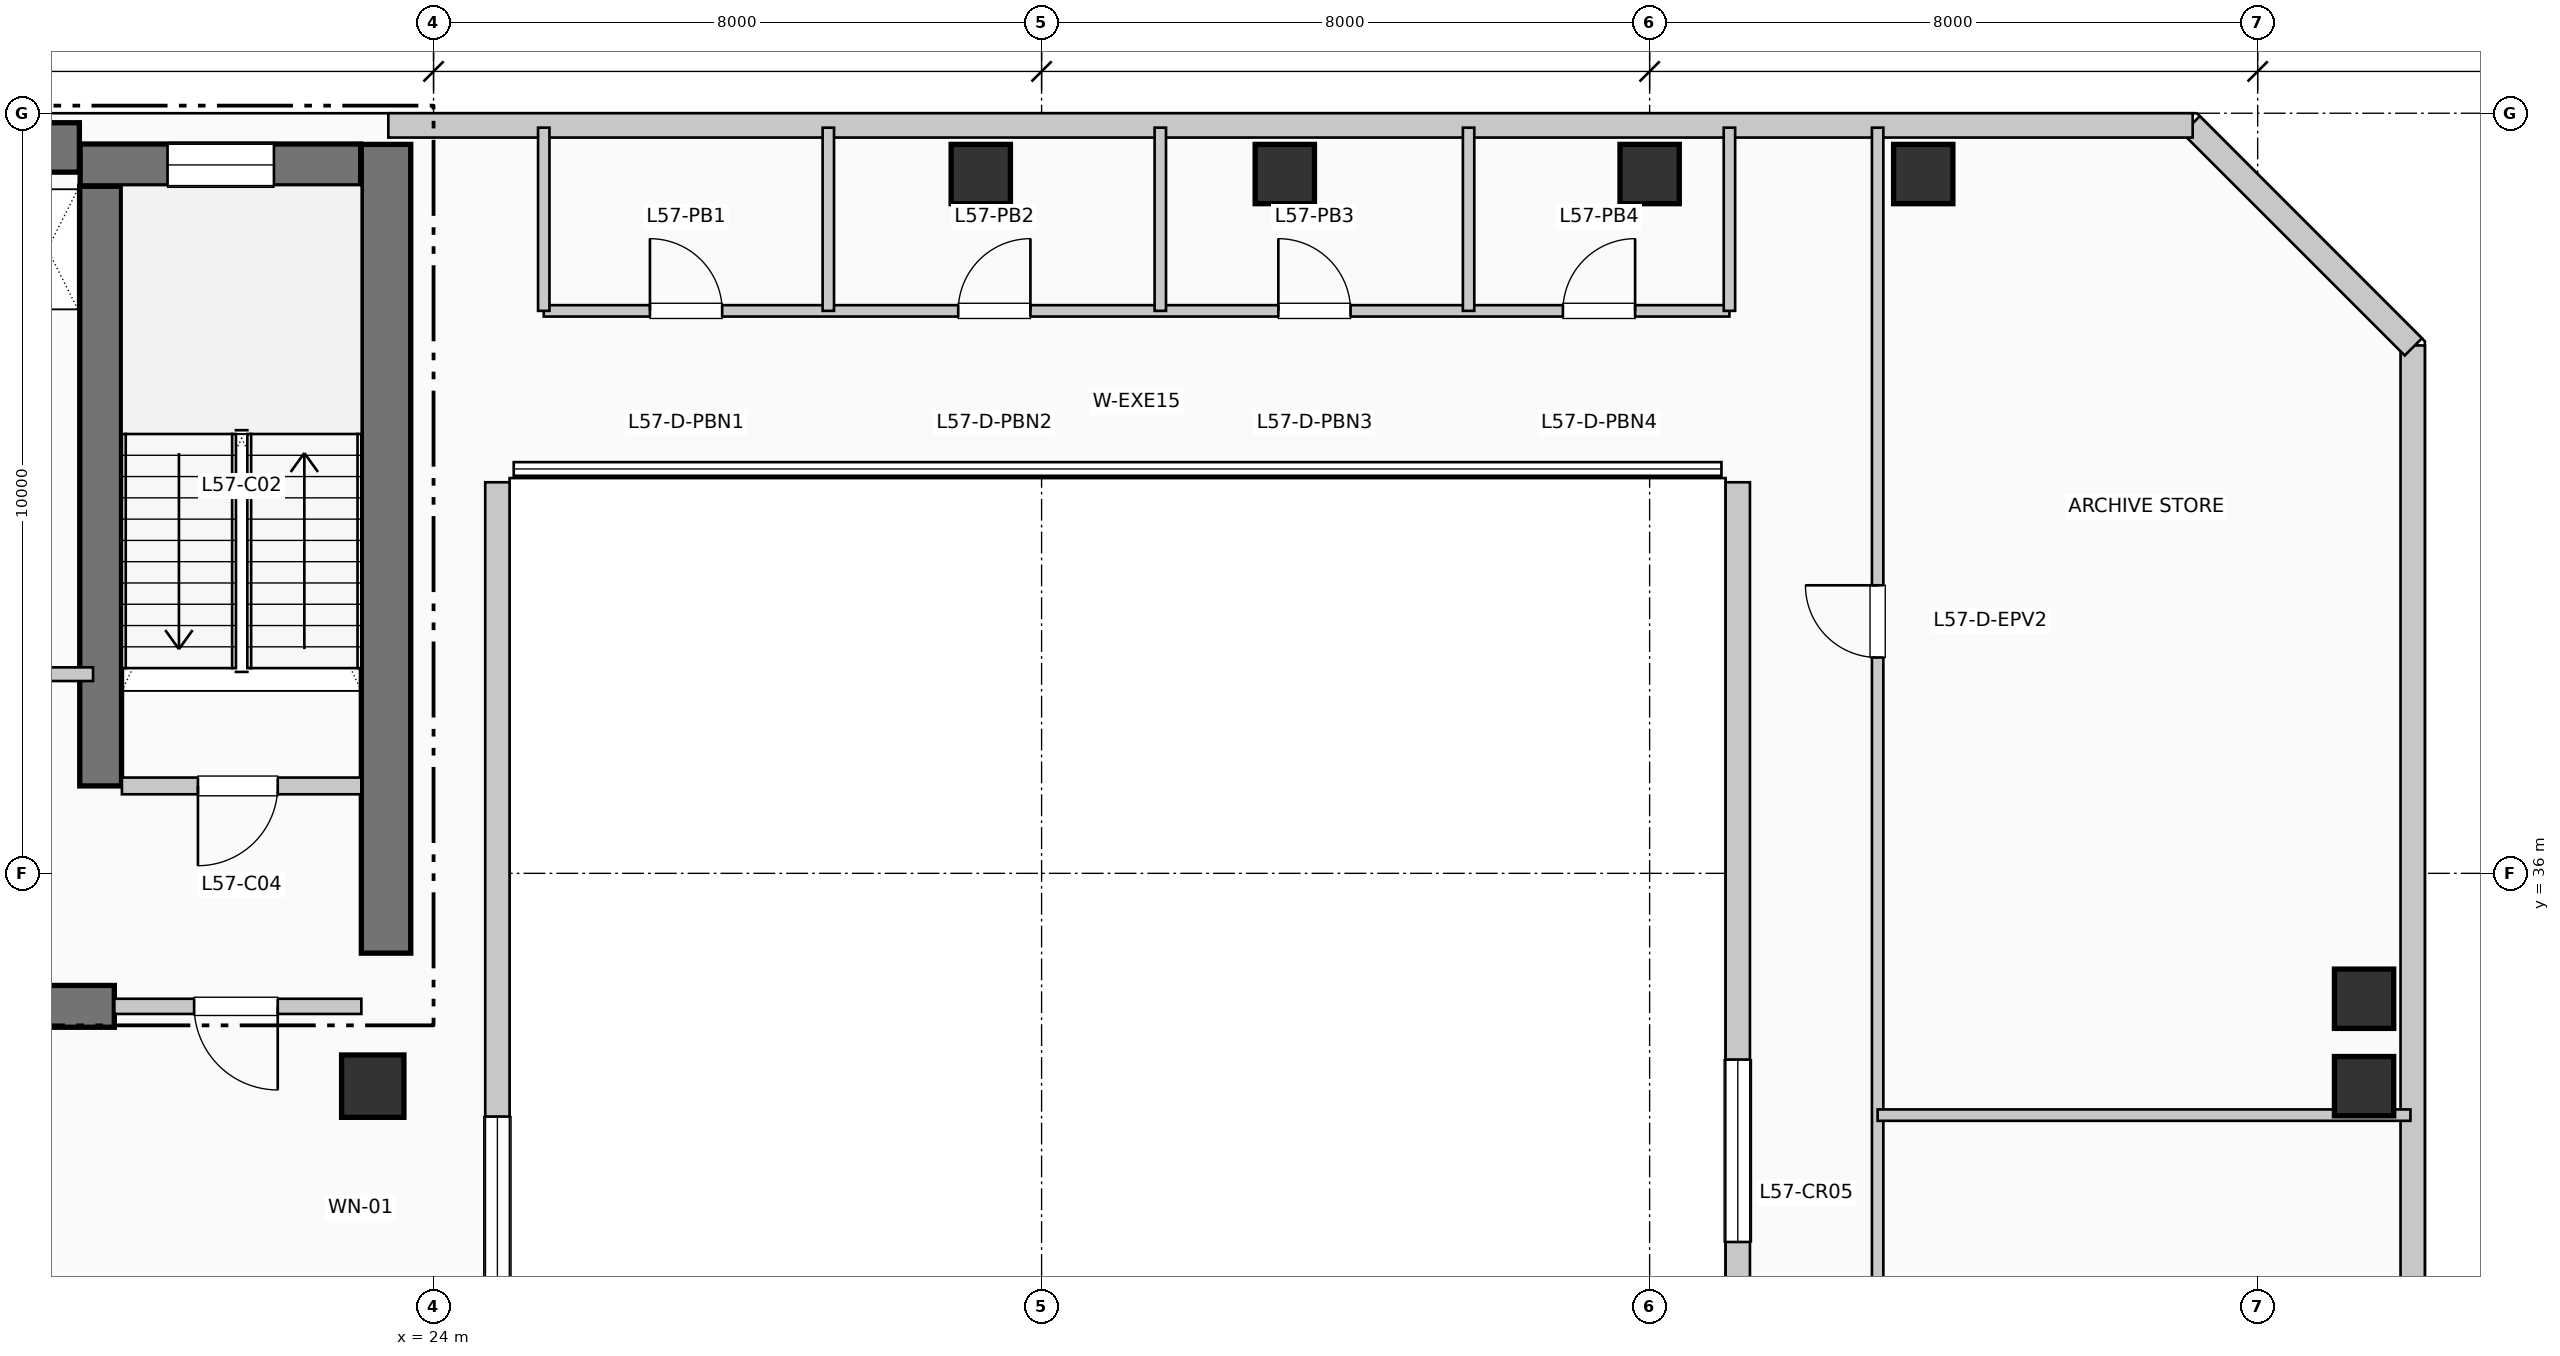
"""IFC4 building model, lengths in metres.
Left out: names, types, materials, properties, quantities, classifications, styles, units other than length and angle.
Written with IfcOpenShell. Run it as: python <this file> out.ifc"""

import sys

from ifc_helpers import new_model, si_unit, direction, frame, frame_2d, origin, origin_2d, place, context, subcontext, project, spatial, rectangle, extrude, element, fill, save


model = new_model("IFC4")
c1 = context("Model", 3, precision=1e-05, world=origin(), true_north=direction((0.0, 1.0)))
c2 = subcontext(c1, "Body", "Model", "MODEL_VIEW")
j1 = project(units=[si_unit("LENGTHUNIT", "METRE"), si_unit("PLANEANGLEUNIT", "RADIAN")], contexts=[c1])
p1 = place(None, origin())
s1 = spatial("IfcSite", under=j1, at=p1, CompositionType="ELEMENT")
p2 = place(p1, origin())
s2 = spatial("IfcBuilding", under=s1, at=p2, CompositionType="ELEMENT")
p3 = place(p2, frame((0.0, 0.0, 235.62)))
s3 = spatial("IfcBuildingStorey", under=s2, at=p3, CompositionType="ELEMENT", Elevation=235.62)
p4 = place(p3, frame((5.36, 45.55, 0.0), z_axis=(0.0, 0.0, 1.0), x_axis=(1.0, 0.0, 0.0)))
e1 = element("IfcWall", 1, at=p4, inside=s3, PredefinedType="SHEAR", context=c2, shape_type="SweptSolid", body=[
    extrude(rectangle(XDim=13.98, YDim=0.65, at=frame_2d((6.99, 0.0))), origin(), (0.0, 0.0, 1.0), 3.96),
])
p5 = place(p3, frame((23.375, 34.95, 0.0), z_axis=(0.0, 0.0, 1.0), x_axis=(0.0, 1.0, 0.0)))
e2 = element("IfcWall", 2, at=p5, inside=s3, PredefinedType="SHEAR", context=c2, shape_type="SweptSolid", body=[
    extrude(rectangle(XDim=10.64, YDim=0.65, at=frame_2d((5.32, 0.0))), origin(), (0.0, 0.0, 1.0), 3.96),
])
p6 = place(p3, frame((13.68, 34.25, 0.0), z_axis=(0.0, 0.0, 1.0), x_axis=(1.0, 0.0, 0.0)))
e3 = element("IfcWall", 3, at=p6, inside=s3, PredefinedType="SHEAR", context=c2, shape_type="SweptSolid", body=[
    extrude(rectangle(XDim=6.12, YDim=0.55, at=frame_2d((3.06, 0.0))), origin(), (0.0, 0.0, 1.0), 3.96),
])
p7 = place(p3, frame((19.62, 37.15, 0.0), z_axis=(0.0, 0.0, 1.0), x_axis=(0.0, 1.0, 0.0)))
e4 = element("IfcWall", 4, at=p7, inside=s3, PredefinedType="SHEAR", context=c2, shape_type="SweptSolid", body=[
    extrude(rectangle(XDim=7.89, YDim=0.55, at=frame_2d((3.945, 0.0))), origin(), (0.0, 0.0, 1.0), 3.96),
])
p8 = place(p3, frame((19.35, 45.32, 0.0), z_axis=(0.0, 0.0, 1.0), x_axis=(1.0, 0.0, 0.0)))
e5 = element("IfcWall", 5, at=p8, inside=s3, PredefinedType="SHEAR", context=c2, shape_type="SweptSolid", body=[
    extrude(rectangle(XDim=3.69, YDim=0.55, at=frame_2d((1.845, 0.0))), origin(), (0.0, 0.0, 1.0), 3.96),
])
p9 = place(p8, frame((1.15, 0.0, 1.05)))
e6 = element("IfcOpeningElement", 6, at=p9, cuts=e5, PredefinedType="OPENING", context=c2, shape_type="SweptSolid", body=[
    extrude(rectangle(XDim=1.4, YDim=1.8, at=frame_2d((0.7, 0.9))), frame((0.0, 0.285, 0.0), z_axis=(0.0, -1.0, 0.0), x_axis=(1.0, 0.0, 0.0)), (0.0, 0.0, 1.0), 0.57),
])
p10 = place(p3, frame((23.2, 33.2, 0.0), z_axis=(0.0, 0.0, 1.0), x_axis=(1.0, 0.0, 0.0)))
e7 = element("IfcColumn", 7, at=p10, inside=s3, PredefinedType="COLUMN", context=c2, shape_type="SweptSolid", body=[
    extrude(rectangle(XDim=0.82, YDim=0.82, at=origin_2d()), origin(), (0.0, 0.0, 1.0), 3.96),
])
for number, where, z_axis, x_axis in (
    (8, (31.2, 45.2, 0.0), (0.0, 0.0, 1.0), (1.0, 0.0, 0.0)),
    (9, (35.2, 45.2, 0.0), (0.0, 0.0, 1.0), (1.0, 0.0, 0.0)),
    (10, (40.0, 45.2, 0.0), (0.0, 0.0, 1.0), (1.0, 0.0, 0.0)),
    (11, (43.6, 45.2, 0.0), (0.0, 0.0, 1.0), (1.0, 0.0, 0.0)),
    (12, (49.4, 33.2, 0.0), (0.0, 0.0, 1.0), (1.0, 0.0, 0.0)),
    (13, (49.4, 34.35, 0.0), (0.0, 0.0, 1.0), (1.0, 0.0, 0.0)),
):
    element("IfcColumn", number, at=place(p3, frame(where, z_axis=z_axis, x_axis=x_axis)), inside=s3, PredefinedType="COLUMN", context=c2, shape_type="SweptSolid", body=[
        extrude(rectangle(XDim=0.78, YDim=0.78, at=origin_2d()), origin(), (0.0, 0.0, 1.0), 3.96),
    ])
p11 = place(p3, frame((24.84, 22.055, 0.0), z_axis=(0.0, 0.0, 1.0), x_axis=(0.0, 1.0, 0.0)))
e14 = element("IfcWall", 14, at=p11, inside=s3, PredefinedType="SOLIDWALL", context=c2, shape_type="SweptSolid", body=[
    extrude(rectangle(XDim=19.09, YDim=0.32, at=frame_2d((9.545, 0.0))), origin(), (0.0, 0.0, 1.0), 3.71),
])
p12 = place(p11, frame((8.345, 0.0, 0.85)))
e15 = element("IfcOpeningElement", 15, at=p12, cuts=e14, PredefinedType="OPENING", context=c2, shape_type="SweptSolid", body=[
    extrude(rectangle(XDim=2.4, YDim=2.05, at=frame_2d((1.2, 1.025))), frame((0.0, 0.17, 0.0), z_axis=(0.0, -1.0, 0.0), x_axis=(1.0, 0.0, 0.0)), (0.0, 0.0, 1.0), 0.34),
])
p13 = place(p3, frame((41.16, 41.145, 0.0), z_axis=(0.0, 0.0, 1.0), x_axis=(0.0, -1.0, 0.0)))
e16 = element("IfcWall", 16, at=p13, inside=s3, PredefinedType="SOLIDWALL", context=c2, shape_type="SweptSolid", body=[
    extrude(rectangle(XDim=17.59, YDim=0.32, at=frame_2d((8.795, 0.0))), origin(), (0.0, 0.0, 1.0), 3.71),
])
p14 = place(p13, frame((7.595, 0.0, 0.85)))
e17 = element("IfcOpeningElement", 17, at=p14, cuts=e16, PredefinedType="OPENING", context=c2, shape_type="SweptSolid", body=[
    extrude(rectangle(XDim=2.4, YDim=2.05, at=frame_2d((1.2, 1.025))), frame((0.0, 0.17, 0.0), z_axis=(0.0, -1.0, 0.0), x_axis=(1.0, 0.0, 0.0)), (0.0, 0.0, 1.0), 0.34),
])
p15 = place(p3, frame((50.04, 25.055, 0.0), z_axis=(0.0, 0.0, 1.0), x_axis=(0.0, 1.0, 0.0)))
e18 = element("IfcWall", 18, at=p15, inside=s3, PredefinedType="SOLIDWALL", context=c2, shape_type="SweptSolid", body=[
    extrude(rectangle(XDim=17.89, YDim=0.32, at=frame_2d((8.945, 0.0))), origin(), (0.0, 0.0, 1.0), 3.71),
])
p16 = place(p3, frame((50.048, 42.926, 0.0), z_axis=(0.0, 0.0, 1.0), x_axis=(-0.707136318428, 0.707077242712, 0.0)))
e19 = element("IfcWall", 19, at=p16, inside=s3, PredefinedType="SOLIDWALL", context=c2, shape_type="SweptSolid", body=[
    extrude(rectangle(XDim=4.133, YDim=0.32, at=frame_2d((2.066, 0.0))), origin(), (0.0, 0.0, 1.0), 3.71),
])
p17 = place(p3, frame((47.145, 45.84, 0.0), z_axis=(0.0, 0.0, 1.0), x_axis=(-1.0, 0.0, 0.0)))
e20 = element("IfcWall", 20, at=p17, inside=s3, PredefinedType="SOLIDWALL", context=c2, shape_type="SweptSolid", body=[
    extrude(rectangle(XDim=23.74, YDim=0.32, at=frame_2d((11.87, 0.0))), origin(), (0.0, 0.0, 1.0), 3.71),
])
p18 = place(p3, frame((19.9, 37.15, 0.0), z_axis=(0.0, 0.0, 1.0), x_axis=(1.0, 0.0, 0.0)))
e21 = element("IfcWall", 21, at=p18, inside=s3, PredefinedType="PARTITIONING", context=c2, shape_type="SweptSolid", body=[
    extrude(rectangle(XDim=3.15, YDim=0.22, at=frame_2d((1.575, 0.0))), origin(), (0.0, 0.0, 1.0), 3.71),
])
p19 = place(p18, frame((2.05, 0.0, 0.0), z_axis=(0.0, 0.0, 1.0), x_axis=(-1.0, 0.0, 0.0)))
e22 = element("IfcOpeningElement", 22, at=p19, cuts=e21, PredefinedType="OPENING", context=c2, shape_type="SweptSolid", body=[
    extrude(rectangle(XDim=1.05, YDim=2.15, at=frame_2d((0.525, 1.075))), frame((0.0, 0.12, 0.0), z_axis=(0.0, -1.0, 0.0), x_axis=(1.0, 0.0, 0.0)), (0.0, 0.0, 1.0), 0.24),
])
p20 = place(p3, frame((19.8, 34.25, 0.0), z_axis=(0.0, 0.0, 1.0), x_axis=(1.0, 0.0, 0.0)))
e23 = element("IfcWall", 23, at=p20, inside=s3, PredefinedType="PARTITIONING", context=c2, shape_type="SweptSolid", body=[
    extrude(rectangle(XDim=3.25, YDim=0.2, at=frame_2d((1.625, 0.0))), origin(), (0.0, 0.0, 1.0), 3.71),
])
p21 = place(p20, frame((2.15, 0.0, 0.0), z_axis=(0.0, 0.0, 1.0), x_axis=(-1.0, 0.0, 0.0)))
e24 = element("IfcOpeningElement", 24, at=p21, cuts=e23, PredefinedType="OPENING", context=c2, shape_type="SweptSolid", body=[
    extrude(rectangle(XDim=1.1, YDim=2.15, at=frame_2d((0.55, 1.075))), frame((0.0, 0.11, 0.0), z_axis=(0.0, -1.0, 0.0), x_axis=(1.0, 0.0, 0.0)), (0.0, 0.0, 1.0), 0.22),
])
p22 = place(p3, frame((17.68, 38.62, 0.0), z_axis=(0.0, 0.0, 1.0), x_axis=(1.0, 0.0, 0.0)))
e25 = element("IfcWall", 25, at=p22, inside=s3, PredefinedType="PARTITIONING", context=c2, shape_type="SweptSolid", body=[
    extrude(rectangle(XDim=1.84, YDim=0.18, at=frame_2d((0.92, 0.0))), origin(), (0.0, 0.0, 1.0), 3.71),
])
p23 = place(p22, frame((0.24, 0.0, 0.0)))
e26 = element("IfcOpeningElement", 26, at=p23, cuts=e25, PredefinedType="OPENING", context=c2, shape_type="SweptSolid", body=[
    extrude(rectangle(XDim=0.92, YDim=2.1, at=frame_2d((0.46, 1.05))), frame((0.0, 0.1, 0.0), z_axis=(0.0, -1.0, 0.0), x_axis=(1.0, 0.0, 0.0)), (0.0, 0.0, 1.0), 0.2),
])
p24 = place(p3, frame((25.45, 43.4, 0.0), z_axis=(0.0, 0.0, 1.0), x_axis=(1.0, 0.0, 0.0)))
e27 = element("IfcWall", 27, at=p24, inside=s3, PredefinedType="PARTITIONING", context=c2, shape_type="SweptSolid", body=[
    extrude(rectangle(XDim=15.6, YDim=0.15, at=frame_2d((7.8, 0.0))), origin(), (0.0, 0.0, 1.0), 3.71),
])
p25 = place(p24, frame((1.397, 0.0, 0.0)))
e28 = element("IfcOpeningElement", 28, at=p25, cuts=e27, PredefinedType="OPENING", context=c2, shape_type="SweptSolid", body=[
    extrude(rectangle(XDim=0.95, YDim=2.15, at=frame_2d((0.475, 1.075))), frame((0.0, 0.085, 0.0), z_axis=(0.0, -1.0, 0.0), x_axis=(1.0, 0.0, 0.0)), (0.0, 0.0, 1.0), 0.17),
])
p26 = place(p24, frame((5.453, 0.0, 0.0)))
e29 = element("IfcOpeningElement", 29, at=p26, cuts=e27, PredefinedType="OPENING", context=c2, shape_type="SweptSolid", body=[
    extrude(rectangle(XDim=0.95, YDim=2.15, at=frame_2d((0.475, 1.075))), frame((0.0, 0.085, 0.0), z_axis=(0.0, -1.0, 0.0), x_axis=(1.0, 0.0, 0.0)), (0.0, 0.0, 1.0), 0.17),
])
p27 = place(p24, frame((9.665, 0.0, 0.0)))
e30 = element("IfcOpeningElement", 30, at=p27, cuts=e27, PredefinedType="OPENING", context=c2, shape_type="SweptSolid", body=[
    extrude(rectangle(XDim=0.95, YDim=2.15, at=frame_2d((0.475, 1.075))), frame((0.0, 0.085, 0.0), z_axis=(0.0, -1.0, 0.0), x_axis=(1.0, 0.0, 0.0)), (0.0, 0.0, 1.0), 0.17),
])
p28 = place(p24, frame((13.409, 0.0, 0.0)))
e31 = element("IfcOpeningElement", 31, at=p28, cuts=e27, PredefinedType="OPENING", context=c2, shape_type="SweptSolid", body=[
    extrude(rectangle(XDim=0.95, YDim=2.15, at=frame_2d((0.475, 1.075))), frame((0.0, 0.085, 0.0), z_axis=(0.0, -1.0, 0.0), x_axis=(1.0, 0.0, 0.0)), (0.0, 0.0, 1.0), 0.17),
])
for number, where, z_axis, x_axis in (
    (32, (25.45, 43.4, 0.0), (0.0, 0.0, 1.0), (0.0, 1.0, 0.0)),
    (33, (41.05, 43.4, 0.0), (0.0, 0.0, 1.0), (0.0, 1.0, 0.0)),
    (34, (29.194, 43.4, 0.0), (0.0, 0.0, 1.0), (0.0, 1.0, 0.0)),
    (35, (33.562, 43.4, 0.0), (0.0, 0.0, 1.0), (0.0, 1.0, 0.0)),
    (36, (37.618, 43.4, 0.0), (0.0, 0.0, 1.0), (0.0, 1.0, 0.0)),
):
    element("IfcWall", number, at=place(p3, frame(where, z_axis=z_axis, x_axis=x_axis)), inside=s3, PredefinedType="PARTITIONING", context=c2, shape_type="SweptSolid", body=[
        extrude(rectangle(XDim=2.41, YDim=0.15, at=frame_2d((1.205, 0.0))), origin(), (0.0, 0.0, 1.0), 3.71),
    ])
p29 = place(p3, frame((43.0, 22.19, 0.0), z_axis=(0.0, 0.0, 1.0), x_axis=(0.0, 1.0, 0.0)))
e37 = element("IfcWall", 37, at=p29, inside=s3, PredefinedType="PARTITIONING", context=c2, shape_type="SweptSolid", body=[
    extrude(rectangle(XDim=23.62, YDim=0.15, at=frame_2d((11.81, 0.0))), origin(), (0.0, 0.0, 1.0), 3.71),
])
p30 = place(p29, frame((4.84, 0.0, 0.0)))
e38 = element("IfcOpeningElement", 38, at=p30, cuts=e37, PredefinedType="OPENING", context=c2, shape_type="SweptSolid", body=[
    extrude(rectangle(XDim=0.95, YDim=2.15, at=frame_2d((0.475, 1.075))), frame((0.0, 0.085, 0.0), z_axis=(0.0, -1.0, 0.0), x_axis=(1.0, 0.0, 0.0)), (0.0, 0.0, 1.0), 0.17),
])
p31 = place(p29, frame((16.649, 0.0, 0.0)))
e39 = element("IfcOpeningElement", 39, at=p31, cuts=e37, PredefinedType="OPENING", context=c2, shape_type="SweptSolid", body=[
    extrude(rectangle(XDim=0.95, YDim=2.15, at=frame_2d((0.475, 1.075))), frame((0.0, 0.085, 0.0), z_axis=(0.0, -1.0, 0.0), x_axis=(1.0, 0.0, 0.0)), (0.0, 0.0, 1.0), 0.17),
])
p32 = place(p3, frame((43.0, 32.819, 0.0), z_axis=(0.0, 0.0, 1.0), x_axis=(1.0, 0.0, 0.0)))
e40 = element("IfcWall", 40, at=p32, inside=s3, PredefinedType="PARTITIONING", context=c2, shape_type="SweptSolid", body=[
    extrude(rectangle(XDim=7.01, YDim=0.15, at=frame_2d((3.505, 0.0))), origin(), (0.0, 0.0, 1.0), 3.71),
])
p33 = place(p9, origin())
e41 = element("IfcWindow", 41, at=p33, inside=s3, PartitioningType="SINGLE_PANEL", PredefinedType="WINDOW", context=c2, shape_type="SweptSolid", body=[
    extrude(rectangle(XDim=1.4, YDim=1.8, at=frame_2d((0.7, 0.9))), frame((0.0, 0.03, 0.0), z_axis=(0.0, -1.0, 0.0), x_axis=(1.0, 0.0, 0.0)), (0.0, 0.0, 1.0), 0.06),
])
fill(e6, e41)
p34 = place(p12, origin())
e42 = element("IfcWindow", 42, at=p34, inside=s3, PartitioningType="SINGLE_PANEL", PredefinedType="WINDOW", context=c2, shape_type="SweptSolid", body=[
    extrude(rectangle(XDim=2.4, YDim=2.05, at=frame_2d((1.2, 1.025))), frame((0.0, 0.03, 0.0), z_axis=(0.0, -1.0, 0.0), x_axis=(1.0, 0.0, 0.0)), (0.0, 0.0, 1.0), 0.06),
])
fill(e15, e42)
p35 = place(p14, origin())
e43 = element("IfcWindow", 43, at=p35, inside=s3, PartitioningType="SINGLE_PANEL", PredefinedType="WINDOW", context=c2, shape_type="SweptSolid", body=[
    extrude(rectangle(XDim=2.4, YDim=2.05, at=frame_2d((1.2, 1.025))), frame((0.0, 0.03, 0.0), z_axis=(0.0, -1.0, 0.0), x_axis=(1.0, 0.0, 0.0)), (0.0, 0.0, 1.0), 0.06),
])
fill(e17, e43)
p36 = place(p19, origin())
e44 = element("IfcDoor", 44, at=p36, inside=s3, OperationType="SINGLE_SWING_LEFT", PredefinedType="DOOR", context=c2, shape_type="SweptSolid", body=[
    extrude(rectangle(XDim=1.05, YDim=2.15, at=frame_2d((0.525, 1.075))), frame((0.0, 0.025, 0.0), z_axis=(0.0, -1.0, 0.0), x_axis=(1.0, 0.0, 0.0)), (0.0, 0.0, 1.0), 0.05),
])
fill(e22, e44)
p37 = place(p21, origin())
e45 = element("IfcDoor", 45, at=p37, inside=s3, OperationType="SINGLE_SWING_RIGHT", PredefinedType="DOOR", context=c2, shape_type="SweptSolid", body=[
    extrude(rectangle(XDim=1.1, YDim=2.15, at=frame_2d((0.55, 1.075))), frame((0.0, 0.025, 0.0), z_axis=(0.0, -1.0, 0.0), x_axis=(1.0, 0.0, 0.0)), (0.0, 0.0, 1.0), 0.05),
])
fill(e24, e45)
p38 = place(p25, origin())
e46 = element("IfcDoor", 46, at=p38, inside=s3, OperationType="SINGLE_SWING_LEFT", PredefinedType="DOOR", context=c2, shape_type="SweptSolid", body=[
    extrude(rectangle(XDim=0.95, YDim=2.15, at=frame_2d((0.475, 1.075))), frame((0.0, 0.025, 0.0), z_axis=(0.0, -1.0, 0.0), x_axis=(1.0, 0.0, 0.0)), (0.0, 0.0, 1.0), 0.05),
])
fill(e28, e46)
p39 = place(p26, origin())
e47 = element("IfcDoor", 47, at=p39, inside=s3, OperationType="SINGLE_SWING_RIGHT", PredefinedType="DOOR", context=c2, shape_type="SweptSolid", body=[
    extrude(rectangle(XDim=0.95, YDim=2.15, at=frame_2d((0.475, 1.075))), frame((0.0, 0.025, 0.0), z_axis=(0.0, -1.0, 0.0), x_axis=(1.0, 0.0, 0.0)), (0.0, 0.0, 1.0), 0.05),
])
fill(e29, e47)
p40 = place(p27, origin())
e48 = element("IfcDoor", 48, at=p40, inside=s3, OperationType="SINGLE_SWING_LEFT", PredefinedType="DOOR", context=c2, shape_type="SweptSolid", body=[
    extrude(rectangle(XDim=0.95, YDim=2.15, at=frame_2d((0.475, 1.075))), frame((0.0, 0.025, 0.0), z_axis=(0.0, -1.0, 0.0), x_axis=(1.0, 0.0, 0.0)), (0.0, 0.0, 1.0), 0.05),
])
fill(e30, e48)
p41 = place(p28, origin())
e49 = element("IfcDoor", 49, at=p41, inside=s3, OperationType="SINGLE_SWING_RIGHT", PredefinedType="DOOR", context=c2, shape_type="SweptSolid", body=[
    extrude(rectangle(XDim=0.95, YDim=2.15, at=frame_2d((0.475, 1.075))), frame((0.0, 0.025, 0.0), z_axis=(0.0, -1.0, 0.0), x_axis=(1.0, 0.0, 0.0)), (0.0, 0.0, 1.0), 0.05),
])
fill(e31, e49)
p42 = place(p31, origin())
e50 = element("IfcDoor", 50, at=p42, inside=s3, OperationType="SINGLE_SWING_RIGHT", PredefinedType="DOOR", context=c2, shape_type="SweptSolid", body=[
    extrude(rectangle(XDim=0.95, YDim=2.15, at=frame_2d((0.475, 1.075))), frame((0.0, 0.025, 0.0), z_axis=(0.0, -1.0, 0.0), x_axis=(1.0, 0.0, 0.0)), (0.0, 0.0, 1.0), 0.05),
])
fill(e39, e50)
save(model, sys.argv[1])
